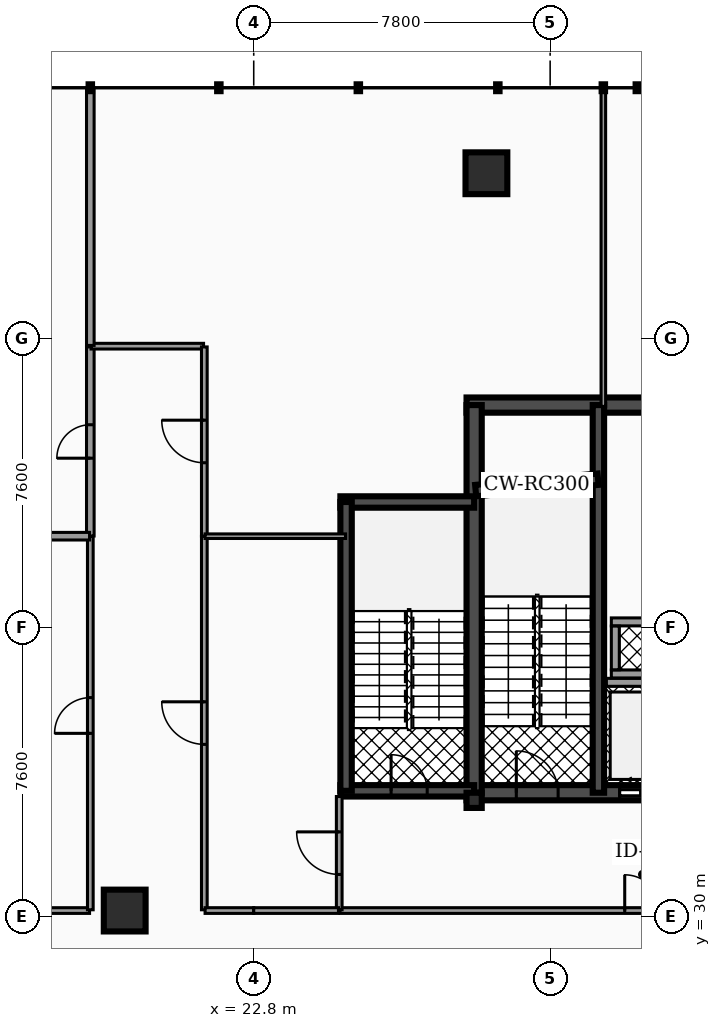
"""IFC4 building model, lengths in metres.
Left out: names, types, materials, properties, quantities, classifications, styles, units other than length and angle.
Written with IfcOpenShell. Run it as: python <this file> out.ifc"""

import sys

from ifc_helpers import new_model, si_unit, direction, frame, frame_2d, origin, origin_2d, place, context, subcontext, project, spatial, rectangle, hollow_rectangle, extrude, element, fill, save


model = new_model("IFC4")
c1 = context("Model", 3, precision=1e-05, world=origin(), true_north=direction((0.0, 1.0)))
c2 = subcontext(c1, "Body", "Model", "MODEL_VIEW")
j1 = project(units=[si_unit("LENGTHUNIT", "METRE"), si_unit("PLANEANGLEUNIT", "RADIAN")], contexts=[c1])
p1 = place(None, origin())
s1 = spatial("IfcSite", under=j1, at=p1, CompositionType="ELEMENT")
p2 = place(p1, origin())
s2 = spatial("IfcBuilding", under=s1, at=p2, CompositionType="ELEMENT")
p3 = place(p2, frame((0.0, 0.0, 9.52)))
s3 = spatial("IfcBuildingStorey", under=s2, at=p3, CompositionType="ELEMENT", Elevation=9.52)
p4 = place(p3, frame((28.4, 43.45, 0.0), z_axis=(0.0, 0.0, 1.0), x_axis=(1.0, 0.0, 0.0)))
e1 = element("IfcWall", 1, at=p4, inside=s3, PredefinedType="SHEAR", context=c2, shape_type="SweptSolid", body=[
    extrude(rectangle(XDim=20.06, YDim=0.4, at=frame_2d((10.03, 0.0))), origin(), (0.0, 0.0, 1.0), 4.14),
])
p5 = place(p3, frame((28.4, 33.25, 0.0), z_axis=(0.0, 0.0, 1.0), x_axis=(1.0, 0.0, 0.0)))
e2 = element("IfcWall", 2, at=p5, inside=s3, PredefinedType="SHEAR", context=c2, shape_type="SweptSolid", body=[
    extrude(rectangle(XDim=20.06, YDim=0.4, at=frame_2d((10.03, 0.0))), origin(), (0.0, 0.0, 1.0), 4.14),
])
p6 = place(p5, frame((4.03, 0.0, 0.0)))
e3 = element("IfcOpeningElement", 3, at=p6, cuts=e2, PredefinedType="OPENING", context=c2, shape_type="SweptSolid", body=[
    extrude(rectangle(XDim=1.1, YDim=2.15, at=frame_2d((0.55, 1.075))), frame((0.0, 0.21, 0.0), z_axis=(0.0, -1.0, 0.0), x_axis=(1.0, 0.0, 0.0)), (0.0, 0.0, 1.0), 0.42),
])
p7 = place(p5, frame((14.87, 0.0, 0.0)))
e4 = element("IfcOpeningElement", 4, at=p7, cuts=e2, PredefinedType="OPENING", context=c2, shape_type="SweptSolid", body=[
    extrude(rectangle(XDim=1.1, YDim=2.15, at=frame_2d((0.55, 1.075))), frame((0.0, 0.21, 0.0), z_axis=(0.0, -1.0, 0.0), x_axis=(1.0, 0.0, 0.0)), (0.0, 0.0, 1.0), 0.42),
])
p8 = place(p5, frame((1.31, 0.0, 0.0)))
e5 = element("IfcOpeningElement", 5, at=p8, cuts=e2, PredefinedType="OPENING", context=c2, shape_type="SweptSolid", body=[
    extrude(rectangle(XDim=1.1, YDim=2.2, at=frame_2d((0.55, 1.1))), frame((0.0, 0.21, 0.0), z_axis=(0.0, -1.0, 0.0), x_axis=(1.0, 0.0, 0.0)), (0.0, 0.0, 1.0), 0.42),
])
p9 = place(p5, frame((9.44, 0.0, 0.0)))
e6 = element("IfcOpeningElement", 6, at=p9, cuts=e2, PredefinedType="OPENING", context=c2, shape_type="SweptSolid", body=[
    extrude(rectangle(XDim=1.12, YDim=2.05, at=frame_2d((0.56, 1.025))), frame((0.0, 0.21, 0.0), z_axis=(0.0, -1.0, 0.0), x_axis=(1.0, 0.0, 0.0)), (0.0, 0.0, 1.0), 0.42),
])
p10 = place(p5, frame((17.65, 0.0, 0.0)))
e7 = element("IfcOpeningElement", 7, at=p10, cuts=e2, PredefinedType="OPENING", context=c2, shape_type="SweptSolid", body=[
    extrude(rectangle(XDim=1.1, YDim=2.2, at=frame_2d((0.55, 1.1))), frame((0.0, 0.21, 0.0), z_axis=(0.0, -1.0, 0.0), x_axis=(1.0, 0.0, 0.0)), (0.0, 0.0, 1.0), 0.42),
])
p11 = place(p3, frame((28.6, 33.25, 0.0), z_axis=(0.0, 0.0, 1.0), x_axis=(0.0, 1.0, 0.0)))
e8 = element("IfcWall", 8, at=p11, inside=s3, PredefinedType="SHEAR", context=c2, shape_type="SweptSolid", body=[
    extrude(rectangle(XDim=10.2, YDim=0.4, at=frame_2d((5.1, 0.0))), origin(), (0.0, 0.0, 1.0), 4.14),
])
p12 = place(p3, frame((31.87, 33.25, 0.0), z_axis=(0.0, 0.0, 1.0), x_axis=(0.0, 1.0, 0.0)))
e9 = element("IfcWall", 9, at=p12, inside=s3, PredefinedType="SHEAR", context=c2, shape_type="SweptSolid", body=[
    extrude(rectangle(XDim=10.2, YDim=0.3, at=frame_2d((5.1, 0.0))), origin(), (0.0, 0.0, 1.0), 4.14),
])
p13 = place(p3, frame((28.64, 41.2, 0.0), z_axis=(0.0, 0.0, 1.0), x_axis=(0.995687118776, 0.092774789157, 0.0)))
e10 = element("IfcWall", 10, at=p13, inside=s3, PredefinedType="SHEAR", context=c2, shape_type="SweptSolid", body=[
    extrude(rectangle(XDim=3.234, YDim=0.3, at=frame_2d((1.617, 0.0))), origin(), (0.0, 0.0, 1.0), 4.14),
])
p14 = place(p3, frame((25.08, 40.9, 0.0), z_axis=(0.0, 0.0, 1.0), x_axis=(1.0, 0.0, 0.0)))
e11 = element("IfcWall", 11, at=p14, inside=s3, PredefinedType="SHEAR", context=c2, shape_type="SweptSolid", body=[
    extrude(rectangle(XDim=3.52, YDim=0.3, at=frame_2d((1.76, 0.0))), origin(), (0.0, 0.0, 1.0), 4.14),
])
p15 = place(p3, frame((25.08, 33.3, 0.0), z_axis=(0.0, 0.0, 1.0), x_axis=(1.0, 0.0, 0.0)))
e12 = element("IfcWall", 12, at=p15, inside=s3, PredefinedType="SHEAR", context=c2, shape_type="SweptSolid", body=[
    extrude(rectangle(XDim=3.52, YDim=0.3, at=frame_2d((1.76, 0.0))), origin(), (0.0, 0.0, 1.0), 4.14),
])
p16 = place(p15, frame((1.335, 0.0, 0.0)))
e13 = element("IfcOpeningElement", 13, at=p16, cuts=e12, PredefinedType="OPENING", context=c2, shape_type="SweptSolid", body=[
    extrude(rectangle(XDim=0.95, YDim=2.2, at=frame_2d((0.475, 1.1))), frame((0.0, 0.16, 0.0), z_axis=(0.0, -1.0, 0.0), x_axis=(1.0, 0.0, 0.0)), (0.0, 0.0, 1.0), 0.32),
])
p17 = place(p3, frame((25.23, 33.3, 0.0), z_axis=(0.0, 0.0, 1.0), x_axis=(0.0, 1.0, 0.0)))
e14 = element("IfcWall", 14, at=p17, inside=s3, PredefinedType="SHEAR", context=c2, shape_type="SweptSolid", body=[
    extrude(rectangle(XDim=7.6, YDim=0.3, at=frame_2d((3.8, 0.0))), origin(), (0.0, 0.0, 1.0), 4.14),
])
for number, where, z_axis, x_axis in (
    (15, (28.923, 49.55, 0.0), (0.0, 0.0, 1.0), (1.0, 0.0, 0.0)),
    (16, (19.405, 30.15, 0.0), (0.0, 0.0, 1.0), (1.0, 0.0, 0.0)),
):
    element("IfcColumn", number, at=place(p3, frame(where, z_axis=z_axis, x_axis=x_axis)), inside=s3, PredefinedType="COLUMN", context=c2, shape_type="SweptSolid", body=[
        extrude(hollow_rectangle(XDim=1.1, YDim=1.1, WallThickness=0.055, at=origin_2d()), origin(), (0.0, 0.0, 1.0), 4.14),
    ])
p18 = place(p3, frame((28.6, 33.05, 0.0), z_axis=(0.0, 0.0, 1.0), x_axis=(1.0, 0.0, 0.0)))
e17 = element("IfcColumn", 17, at=p18, inside=s3, PredefinedType="PILASTER", context=c2, shape_type="SweptSolid", body=[
    extrude(hollow_rectangle(XDim=0.4, YDim=0.4, WallThickness=0.02, at=origin_2d()), origin(), (0.0, 0.0, 1.0), 4.14),
])
p19 = place(p3, frame((32.08, 36.155, 0.0), z_axis=(0.0, 0.0, 1.0), x_axis=(1.0, 0.0, 0.0)))
e18 = element("IfcWall", 18, at=p19, inside=s3, PredefinedType="SOLIDWALL", context=c2, shape_type="SweptSolid", body=[
    extrude(rectangle(XDim=1.8, YDim=0.21, at=frame_2d((0.9, 0.0))), origin(), (0.0, 0.0, 1.0), 3.112),
])
for number, where, z_axis, x_axis in (
    (19, (32.21, 36.375, 0.0), (0.0, 0.0, 1.0), (1.0, 0.0, 0.0)),
    (20, (32.21, 37.745, 0.0), (0.0, 0.0, 1.0), (1.0, 0.0, 0.0)),
):
    element("IfcWall", number, at=place(p3, frame(where, z_axis=z_axis, x_axis=x_axis)), inside=s3, PredefinedType="SOLIDWALL", context=c2, shape_type="SweptSolid", body=[
        extrude(rectangle(XDim=1.6, YDim=0.21, at=frame_2d((0.8, 0.0))), origin(), (0.0, 0.0, 1.0), 4.14),
    ])
p20 = place(p3, frame((32.315, 36.485, 0.0), z_axis=(0.0, 0.0, 1.0), x_axis=(0.0, 1.0, 0.0)))
e21 = element("IfcWall", 21, at=p20, inside=s3, PredefinedType="SOLIDWALL", context=c2, shape_type="SweptSolid", body=[
    extrude(rectangle(XDim=1.15, YDim=0.21, at=frame_2d((0.575, 0.0))), origin(), (0.0, 0.0, 1.0), 4.14),
])
p21 = place(p3, frame((25.07, 30.15, 0.0), z_axis=(0.0, 0.0, 1.0), x_axis=(1.0, 0.0, 0.0)))
e22 = element("IfcWall", 22, at=p21, inside=s3, PredefinedType="PARTITIONING", context=c2, shape_type="SweptSolid", body=[
    extrude(rectangle(XDim=20.325, YDim=0.15, at=frame_2d((10.163, 0.0))), origin(), (0.0, 0.0, 1.0), 3.097),
])
p22 = place(p21, frame((7.492, 0.0, 0.0)))
e23 = element("IfcOpeningElement", 23, at=p22, cuts=e22, PredefinedType="OPENING", context=c2, shape_type="SweptSolid", body=[
    extrude(rectangle(XDim=0.94, YDim=2.05, at=frame_2d((0.47, 1.025))), frame((0.0, 0.085, 0.0), z_axis=(0.0, -1.0, 0.0), x_axis=(1.0, 0.0, 0.0)), (0.0, 0.0, 1.0), 0.17),
])
p23 = place(p3, frame((25.05, 30.17, 0.0), z_axis=(0.0, 0.0, 1.0), x_axis=(0.0, 1.0, 0.0)))
e24 = element("IfcWall", 24, at=p23, inside=s3, PredefinedType="PARTITIONING", context=c2, shape_type="SweptSolid", body=[
    extrude(rectangle(XDim=2.98, YDim=0.15, at=frame_2d((1.49, 0.0))), origin(), (0.0, 0.0, 1.0), 3.097),
])
p24 = place(p23, frame((0.93, 0.0, 0.0)))
e25 = element("IfcOpeningElement", 25, at=p24, cuts=e24, PredefinedType="OPENING", context=c2, shape_type="SweptSolid", body=[
    extrude(rectangle(XDim=1.12, YDim=2.05, at=frame_2d((0.56, 1.025))), frame((0.0, 0.085, 0.0), z_axis=(0.0, -1.0, 0.0), x_axis=(1.0, 0.0, 0.0)), (0.0, 0.0, 1.0), 0.17),
])
p25 = place(p3, frame((11.52, 30.15, 0.0), z_axis=(0.0, 0.0, 1.0), x_axis=(1.0, 0.0, 0.0)))
e26 = element("IfcWall", 26, at=p25, inside=s3, PredefinedType="PARTITIONING", context=c2, shape_type="SweptSolid", body=[
    extrude(rectangle(XDim=6.96, YDim=0.15, at=frame_2d((3.48, 0.0))), origin(), (0.0, 0.0, 1.0), 3.097),
])
p26 = place(p3, frame((18.5, 30.17, 0.0), z_axis=(0.0, 0.0, 1.0), x_axis=(0.0, 1.0, 0.0)))
e27 = element("IfcWall", 27, at=p26, inside=s3, PredefinedType="PARTITIONING", context=c2, shape_type="SweptSolid", body=[
    extrude(rectangle(XDim=9.825, YDim=0.15, at=frame_2d((4.913, 0.0))), origin(), (0.0, 0.0, 1.0), 3.097),
])
p27 = place(p26, frame((4.643, 0.0, 0.0)))
e28 = element("IfcOpeningElement", 28, at=p27, cuts=e27, PredefinedType="OPENING", context=c2, shape_type="SweptSolid", body=[
    extrude(rectangle(XDim=0.94, YDim=2.05, at=frame_2d((0.47, 1.025))), frame((0.0, 0.085, 0.0), z_axis=(0.0, -1.0, 0.0), x_axis=(1.0, 0.0, 0.0)), (0.0, 0.0, 1.0), 0.17),
])
p28 = place(p3, frame((21.5, 30.17, 0.0), z_axis=(0.0, 0.0, 1.0), x_axis=(0.0, 1.0, 0.0)))
e29 = element("IfcWall", 29, at=p28, inside=s3, PredefinedType="PARTITIONING", context=c2, shape_type="SweptSolid", body=[
    extrude(rectangle(XDim=9.825, YDim=0.15, at=frame_2d((4.913, 0.0))), origin(), (0.0, 0.0, 1.0), 3.097),
])
p29 = place(p28, frame((4.353, 0.0, 0.0)))
e30 = element("IfcOpeningElement", 30, at=p29, cuts=e29, PredefinedType="OPENING", context=c2, shape_type="SweptSolid", body=[
    extrude(rectangle(XDim=1.12, YDim=2.05, at=frame_2d((0.56, 1.025))), frame((0.0, 0.085, 0.0), z_axis=(0.0, -1.0, 0.0), x_axis=(1.0, 0.0, 0.0)), (0.0, 0.0, 1.0), 0.17),
])
p30 = place(p3, frame((21.52, 30.15, 0.0), z_axis=(0.0, 0.0, 1.0), x_axis=(1.0, 0.0, 0.0)))
e31 = element("IfcWall", 31, at=p30, inside=s3, PredefinedType="PARTITIONING", context=c2, shape_type="SweptSolid", body=[
    extrude(rectangle(XDim=1.28, YDim=0.15, at=frame_2d((0.64, 0.0))), origin(), (0.0, 0.0, 1.0), 3.097),
])
p31 = place(p3, frame((22.8, 30.15, 0.0), z_axis=(0.0, 0.0, 1.0), x_axis=(1.0, 0.0, 0.0)))
e32 = element("IfcWall", 32, at=p31, inside=s3, PredefinedType="PARTITIONING", context=c2, shape_type="SweptSolid", body=[
    extrude(rectangle(XDim=2.23, YDim=0.15, at=frame_2d((1.115, 0.0))), origin(), (0.0, 0.0, 1.0), 3.097),
])
p32 = place(p3, frame((18.5, 40.005, 0.0), z_axis=(0.0, 0.0, 1.0), x_axis=(0.0, 1.0, 0.0)))
e33 = element("IfcWall", 33, at=p32, inside=s3, PredefinedType="PARTITIONING", context=c2, shape_type="SweptSolid", body=[
    extrude(rectangle(XDim=4.975, YDim=0.2, at=frame_2d((2.488, 0.0))), origin(), (0.0, 0.0, 1.0), 3.097),
])
p33 = place(p32, frame((2.048, 0.0, 0.0)))
e34 = element("IfcOpeningElement", 34, at=p33, cuts=e33, PredefinedType="OPENING", context=c2, shape_type="SweptSolid", body=[
    extrude(rectangle(XDim=0.88, YDim=2.05, at=frame_2d((0.44, 1.025))), frame((0.0, 0.11, 0.0), z_axis=(0.0, -1.0, 0.0), x_axis=(1.0, 0.0, 0.0)), (0.0, 0.0, 1.0), 0.22),
])
p34 = place(p3, frame((18.52, 45.0, 0.0), z_axis=(0.0, 0.0, 1.0), x_axis=(1.0, 0.0, 0.0)))
e35 = element("IfcWall", 35, at=p34, inside=s3, PredefinedType="PARTITIONING", context=c2, shape_type="SweptSolid", body=[
    extrude(rectangle(XDim=2.96, YDim=0.15, at=frame_2d((1.48, 0.0))), origin(), (0.0, 0.0, 1.0), 3.097),
])
p35 = place(p3, frame((21.5, 40.005, 0.0), z_axis=(0.0, 0.0, 1.0), x_axis=(0.0, 1.0, 0.0)))
e36 = element("IfcWall", 36, at=p35, inside=s3, PredefinedType="PARTITIONING", context=c2, shape_type="SweptSolid", body=[
    extrude(rectangle(XDim=4.975, YDim=0.15, at=frame_2d((2.488, 0.0))), origin(), (0.0, 0.0, 1.0), 3.097),
])
p36 = place(p35, frame((1.927, 0.0, 0.0)))
e37 = element("IfcOpeningElement", 37, at=p36, cuts=e36, PredefinedType="OPENING", context=c2, shape_type="SweptSolid", body=[
    extrude(rectangle(XDim=1.12, YDim=2.05, at=frame_2d((0.56, 1.025))), frame((0.0, 0.085, 0.0), z_axis=(0.0, -1.0, 0.0), x_axis=(1.0, 0.0, 0.0)), (0.0, 0.0, 1.0), 0.17),
])
p37 = place(p3, frame((32.0, 43.415, 0.0), z_axis=(0.0, 0.0, 1.0), x_axis=(0.0, 1.0, 0.0)))
e38 = element("IfcWall", 38, at=p37, inside=s3, PredefinedType="PARTITIONING", context=c2, shape_type="SweptSolid", body=[
    extrude(rectangle(XDim=8.37, YDim=0.12, at=frame_2d((4.185, 0.0))), origin(), (0.0, 0.0, 1.0), 3.097),
])
p38 = place(p3, frame((2.415, 40.0, 0.0), z_axis=(0.0, 0.0, 1.0), x_axis=(1.0, 0.0, 0.0)))
e39 = element("IfcWall", 39, at=p38, inside=s3, PredefinedType="PARTITIONING", context=c2, shape_type="SweptSolid", body=[
    extrude(rectangle(XDim=16.065, YDim=0.2, at=frame_2d((8.032, 0.0))), origin(), (0.0, 0.0, 1.0), 3.097),
])
p39 = place(p3, frame((21.52, 40.0, 0.0), z_axis=(0.0, 0.0, 1.0), x_axis=(1.0, 0.0, 0.0)))
e40 = element("IfcWall", 40, at=p39, inside=s3, PredefinedType="PARTITIONING", context=c2, shape_type="SweptSolid", body=[
    extrude(rectangle(XDim=3.695, YDim=0.12, at=frame_2d((1.848, 0.0))), origin(), (0.0, 0.0, 1.0), 3.097),
])
p40 = place(p3, frame((18.5, 45.02, 0.0), z_axis=(0.0, 0.0, 1.0), x_axis=(0.0, 1.0, 0.0)))
e41 = element("IfcWall", 41, at=p40, inside=s3, PredefinedType="PARTITIONING", context=c2, shape_type="SweptSolid", body=[
    extrude(rectangle(XDim=6.765, YDim=0.2, at=frame_2d((3.382, 0.0))), origin(), (0.0, 0.0, 1.0), 3.097),
])
p41 = place(p6, origin())
e42 = element("IfcDoor", 42, at=p41, inside=s3, OperationType="SLIDING_TO_LEFT", PredefinedType="DOOR", context=c2, shape_type="SweptSolid", body=[
    extrude(rectangle(XDim=1.1, YDim=2.15, at=frame_2d((0.55, 1.075))), frame((0.0, 0.025, 0.0), z_axis=(0.0, -1.0, 0.0), x_axis=(1.0, 0.0, 0.0)), (0.0, 0.0, 1.0), 0.05),
])
fill(e3, e42)
p42 = place(p8, origin())
e43 = element("IfcDoor", 43, at=p42, inside=s3, OperationType="SINGLE_SWING_LEFT", PredefinedType="DOOR", context=c2, shape_type="SweptSolid", body=[
    extrude(rectangle(XDim=1.1, YDim=2.2, at=frame_2d((0.55, 1.1))), frame((0.0, 0.025, 0.0), z_axis=(0.0, -1.0, 0.0), x_axis=(1.0, 0.0, 0.0)), (0.0, 0.0, 1.0), 0.05),
])
fill(e5, e43)
p43 = place(p16, origin())
e44 = element("IfcDoor", 44, at=p43, inside=s3, OperationType="SINGLE_SWING_LEFT", PredefinedType="DOOR", context=c2, shape_type="SweptSolid", body=[
    extrude(rectangle(XDim=0.95, YDim=2.2, at=frame_2d((0.475, 1.1))), frame((0.0, 0.025, 0.0), z_axis=(0.0, -1.0, 0.0), x_axis=(1.0, 0.0, 0.0)), (0.0, 0.0, 1.0), 0.05),
])
fill(e13, e44)
p44 = place(p22, origin())
e45 = element("IfcDoor", 45, at=p44, inside=s3, OperationType="SINGLE_SWING_LEFT", PredefinedType="DOOR", context=c2, shape_type="SweptSolid", body=[
    extrude(rectangle(XDim=0.94, YDim=2.05, at=frame_2d((0.47, 1.025))), frame((0.0, 0.025, 0.0), z_axis=(0.0, -1.0, 0.0), x_axis=(1.0, 0.0, 0.0)), (0.0, 0.0, 1.0), 0.05),
])
fill(e23, e45)
p45 = place(p24, origin())
e46 = element("IfcDoor", 46, at=p45, inside=s3, OperationType="SINGLE_SWING_RIGHT", PredefinedType="DOOR", context=c2, shape_type="SweptSolid", body=[
    extrude(rectangle(XDim=1.12, YDim=2.05, at=frame_2d((0.56, 1.025))), frame((0.0, 0.025, 0.0), z_axis=(0.0, -1.0, 0.0), x_axis=(1.0, 0.0, 0.0)), (0.0, 0.0, 1.0), 0.05),
])
fill(e25, e46)
p46 = place(p27, origin())
e47 = element("IfcDoor", 47, at=p46, inside=s3, OperationType="SINGLE_SWING_LEFT", PredefinedType="DOOR", context=c2, shape_type="SweptSolid", body=[
    extrude(rectangle(XDim=0.94, YDim=2.05, at=frame_2d((0.47, 1.025))), frame((0.0, 0.025, 0.0), z_axis=(0.0, -1.0, 0.0), x_axis=(1.0, 0.0, 0.0)), (0.0, 0.0, 1.0), 0.05),
])
fill(e28, e47)
p47 = place(p29, origin())
e48 = element("IfcDoor", 48, at=p47, inside=s3, OperationType="SINGLE_SWING_RIGHT", PredefinedType="DOOR", context=c2, shape_type="SweptSolid", body=[
    extrude(rectangle(XDim=1.12, YDim=2.05, at=frame_2d((0.56, 1.025))), frame((0.0, 0.025, 0.0), z_axis=(0.0, -1.0, 0.0), x_axis=(1.0, 0.0, 0.0)), (0.0, 0.0, 1.0), 0.05),
])
fill(e30, e48)
p48 = place(p33, origin())
e49 = element("IfcDoor", 49, at=p48, inside=s3, OperationType="SINGLE_SWING_LEFT", PredefinedType="DOOR", context=c2, shape_type="SweptSolid", body=[
    extrude(rectangle(XDim=0.88, YDim=2.05, at=frame_2d((0.44, 1.025))), frame((0.0, 0.025, 0.0), z_axis=(0.0, -1.0, 0.0), x_axis=(1.0, 0.0, 0.0)), (0.0, 0.0, 1.0), 0.05),
])
fill(e34, e49)
p49 = place(p36, origin())
e50 = element("IfcDoor", 50, at=p49, inside=s3, OperationType="SINGLE_SWING_RIGHT", PredefinedType="DOOR", context=c2, shape_type="SweptSolid", body=[
    extrude(rectangle(XDim=1.12, YDim=2.05, at=frame_2d((0.56, 1.025))), frame((0.0, 0.025, 0.0), z_axis=(0.0, -1.0, 0.0), x_axis=(1.0, 0.0, 0.0)), (0.0, 0.0, 1.0), 0.05),
])
fill(e37, e50)
save(model, sys.argv[1])
